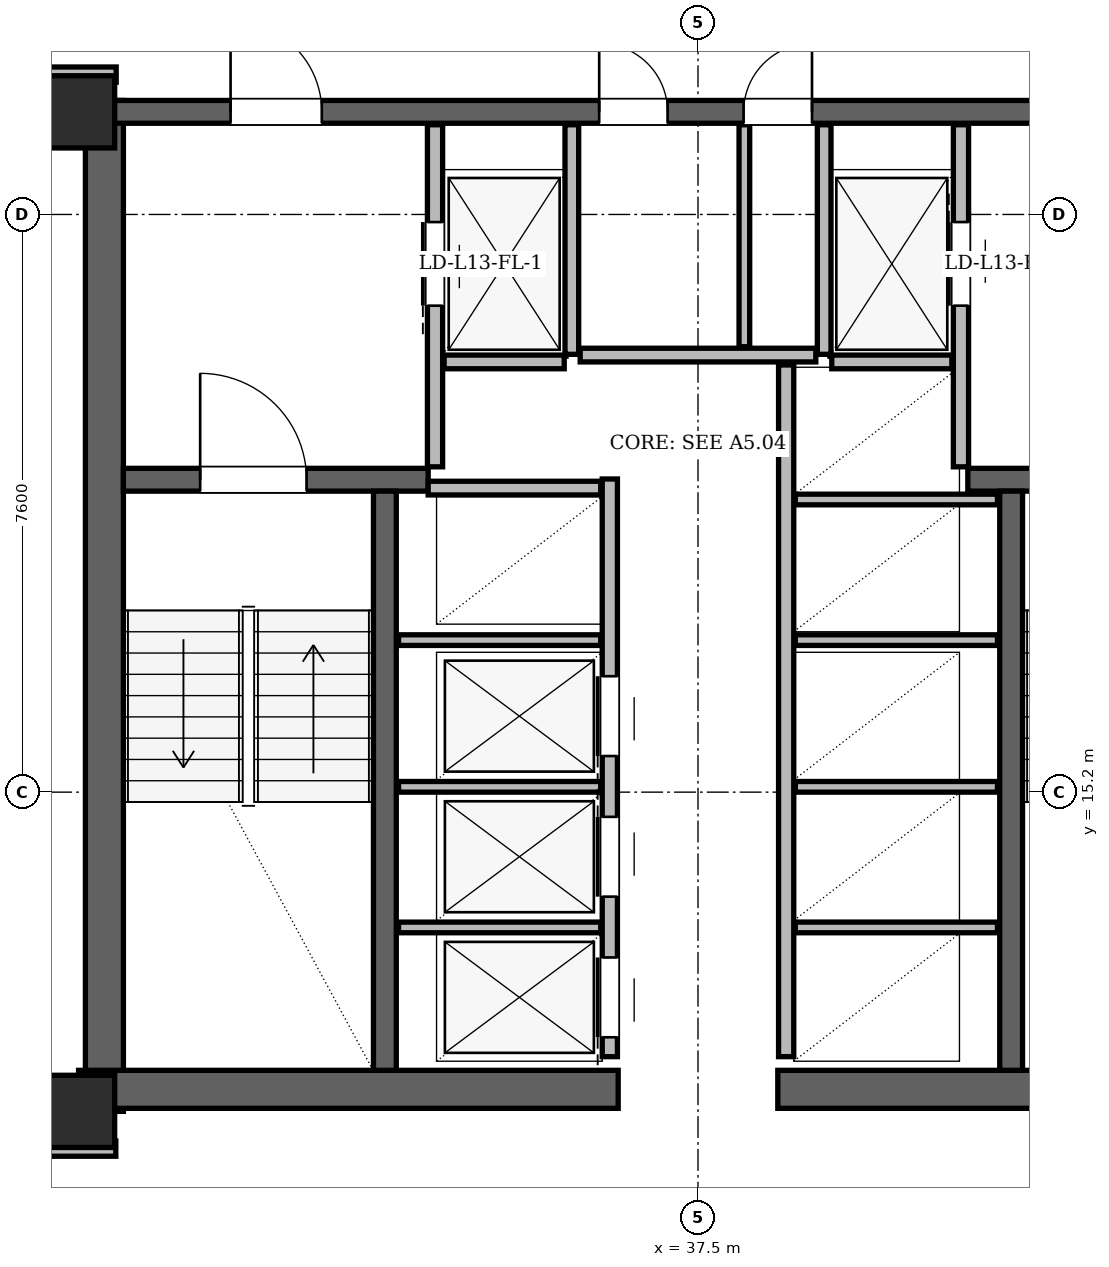
"""IFC4 building model, lengths in metres.
Left out: names, types, materials, properties, quantities, classifications, styles, units other than length and angle.
Written with IfcOpenShell. Run it as: python <this file> out.ifc"""

import sys

from ifc_helpers import new_model, si_unit, direction, frame, frame_2d, origin, origin_2d, place, context, subcontext, project, spatial, rectangle, hollow_rectangle, extrude, element, fill, save


model = new_model("IFC4")
c1 = context("Model", 3, precision=1e-05, world=origin(), true_north=direction((0.0, 1.0)))
c2 = subcontext(c1, "Body", "Model", "MODEL_VIEW")
j1 = project(units=[si_unit("LENGTHUNIT", "METRE"), si_unit("PLANEANGLEUNIT", "RADIAN")], contexts=[c1])
p1 = place(None, origin())
s1 = spatial("IfcSite", under=j1, at=p1, CompositionType="ELEMENT")
p2 = place(p1, origin())
s2 = spatial("IfcBuilding", under=s1, at=p2, CompositionType="ELEMENT")
p3 = place(p2, frame((0.0, 0.0, 52.5)))
s3 = spatial("IfcBuildingStorey", under=s2, at=p3, CompositionType="ELEMENT", Elevation=52.5)
for number, where, z_axis, x_axis in (
    (1, (29.35, 11.0, 0.0), (0.0, 0.0, 1.0), (1.0, 0.0, 0.0)),
    (2, (29.35, 24.15, 0.0), (0.0, 0.0, 1.0), (1.0, 0.0, 0.0)),
):
    element("IfcColumn", number, at=place(p3, frame(where, z_axis=z_axis, x_axis=x_axis)), inside=s3, PredefinedType="COLUMN", context=c2, shape_type="SweptSolid", body=[
        extrude(hollow_rectangle(XDim=0.95, YDim=0.95, WallThickness=0.08, at=origin_2d()), origin(), (0.0, 0.0, 1.0), 3.6),
    ])
p4 = place(p3, frame((29.69, 11.0, 0.0), z_axis=(0.0, 0.0, 1.0), x_axis=(0.0, 1.0, 0.0)))
e3 = element("IfcWall", 3, at=p4, inside=s3, PredefinedType="SHEAR", context=c2, shape_type="SweptSolid", body=[
    extrude(rectangle(XDim=13.3, YDim=0.5, at=frame_2d((6.65, 0.0))), origin(), (0.0, 0.0, 1.0), 3.36),
])
for number, where, z_axis, x_axis in (
    (4, (29.35, 11.29, 0.0), (0.0, 0.0, 1.0), (1.0, 0.0, 0.0)),
    (5, (38.55, 11.29, 0.0), (0.0, 0.0, 1.0), (1.0, 0.0, 0.0)),
):
    element("IfcWall", number, at=place(p3, frame(where, z_axis=z_axis, x_axis=x_axis)), inside=s3, PredefinedType="SHEAR", context=c2, shape_type="SweptSolid", body=[
        extrude(rectangle(XDim=7.1, YDim=0.5, at=frame_2d((3.55, 0.0))), origin(), (0.0, 0.0, 1.0), 3.36),
    ])
p5 = place(p3, frame((29.65, 24.15, 0.0), z_axis=(0.0, 0.0, 1.0), x_axis=(1.0, 0.0, 0.0)))
e6 = element("IfcWall", 6, at=p5, inside=s3, PredefinedType="SHEAR", context=c2, shape_type="SweptSolid", body=[
    extrude(rectangle(XDim=15.7, YDim=0.3, at=frame_2d((7.85, 0.0))), origin(), (0.0, 0.0, 1.0), 3.36),
])
p6 = place(p5, frame((1.7, 0.0, 0.0)))
e7 = element("IfcOpeningElement", 7, at=p6, cuts=e6, PredefinedType="OPENING", context=c2, shape_type="SweptSolid", body=[
    extrude(rectangle(XDim=1.2, YDim=2.2, at=frame_2d((0.6, 1.1))), frame((0.0, 0.15, 0.0), z_axis=(0.0, -1.0, 0.0), x_axis=(1.0, 0.0, 0.0)), (0.0, 0.0, 1.0), 0.3),
])
p7 = place(p5, frame((12.8, 0.0, 0.0)))
e8 = element("IfcOpeningElement", 8, at=p7, cuts=e6, PredefinedType="OPENING", context=c2, shape_type="SweptSolid", body=[
    extrude(rectangle(XDim=1.2, YDim=2.2, at=frame_2d((0.6, 1.1))), frame((0.0, 0.15, 0.0), z_axis=(0.0, -1.0, 0.0), x_axis=(1.0, 0.0, 0.0)), (0.0, 0.0, 1.0), 0.3),
])
p8 = place(p5, frame((6.55, 0.0, 0.0)))
e9 = element("IfcOpeningElement", 9, at=p8, cuts=e6, PredefinedType="OPENING", context=c2, shape_type="SweptSolid", body=[
    extrude(rectangle(XDim=0.9, YDim=2.05, at=frame_2d((0.45, 1.025))), frame((0.0, 0.15, 0.0), z_axis=(0.0, -1.0, 0.0), x_axis=(1.0, 0.0, 0.0)), (0.0, 0.0, 1.0), 0.3),
])
p9 = place(p5, frame((8.45, 0.0, 0.0)))
e10 = element("IfcOpeningElement", 10, at=p9, cuts=e6, PredefinedType="OPENING", context=c2, shape_type="SweptSolid", body=[
    extrude(rectangle(XDim=0.9, YDim=2.05, at=frame_2d((0.45, 1.025))), frame((0.0, 0.15, 0.0), z_axis=(0.0, -1.0, 0.0), x_axis=(1.0, 0.0, 0.0)), (0.0, 0.0, 1.0), 0.3),
])
p10 = place(p3, frame((29.94, 19.31, 0.0), z_axis=(0.0, 0.0, 1.0), x_axis=(1.0, 0.0, 0.0)))
e11 = element("IfcWall", 11, at=p10, inside=s3, PredefinedType="SHEAR", context=c2, shape_type="SweptSolid", body=[
    extrude(rectangle(XDim=4.01, YDim=0.3, at=frame_2d((2.005, 0.0))), origin(), (0.0, 0.0, 1.0), 3.36),
])
p11 = place(p10, frame((1.01, 0.0, 0.0)))
e12 = element("IfcOpeningElement", 12, at=p11, cuts=e11, PredefinedType="OPENING", context=c2, shape_type="SweptSolid", body=[
    extrude(rectangle(XDim=1.4, YDim=2.2, at=frame_2d((0.7, 1.1))), frame((0.0, 0.15, 0.0), z_axis=(0.0, -1.0, 0.0), x_axis=(1.0, 0.0, 0.0)), (0.0, 0.0, 1.0), 0.3),
])
p12 = place(p3, frame((41.05, 19.31, 0.0), z_axis=(0.0, 0.0, 1.0), x_axis=(1.0, 0.0, 0.0)))
e13 = element("IfcWall", 13, at=p12, inside=s3, PredefinedType="SHEAR", context=c2, shape_type="SweptSolid", body=[
    extrude(rectangle(XDim=4.01, YDim=0.3, at=frame_2d((2.005, 0.0))), origin(), (0.0, 0.0, 1.0), 3.36),
])
p13 = place(p12, frame((1.6, 0.0, 0.0)))
e14 = element("IfcOpeningElement", 14, at=p13, cuts=e13, PredefinedType="OPENING", context=c2, shape_type="SweptSolid", body=[
    extrude(rectangle(XDim=1.4, YDim=2.2, at=frame_2d((0.7, 1.1))), frame((0.0, 0.15, 0.0), z_axis=(0.0, -1.0, 0.0), x_axis=(1.0, 0.0, 0.0)), (0.0, 0.0, 1.0), 0.3),
])
for number, where, z_axis, x_axis in (
    (15, (33.38, 11.54, 0.0), (0.0, 0.0, 1.0), (0.0, 1.0, 0.0)),
    (16, (41.62, 11.54, 0.0), (0.0, 0.0, 1.0), (0.0, 1.0, 0.0)),
):
    element("IfcWall", number, at=place(p3, frame(where, z_axis=z_axis, x_axis=x_axis)), inside=s3, PredefinedType="SHEAR", context=c2, shape_type="SweptSolid", body=[
        extrude(rectangle(XDim=7.62, YDim=0.3, at=frame_2d((3.81, 0.0))), origin(), (0.0, 0.0, 1.0), 3.36),
    ])
p14 = place(p3, frame((30.243, 43.574, 0.0), z_axis=(0.0, 0.0, 1.0), x_axis=(-0.500001264705, -0.866024673605, 0.0)))
e17 = element("IfcWall", 17, at=p14, inside=s3, PredefinedType="SOLIDWALL", context=c2, shape_type="SweptSolid", body=[
    extrude(rectangle(XDim=33.402, YDim=0.34, at=frame_2d((16.701, 0.0))), origin(), (0.0, 0.0, 1.0), 2.494),
])
p15 = place(p14, frame((7.615, 0.0, 0.0)))
e18 = element("IfcOpeningElement", 18, at=p15, cuts=e17, PredefinedType="OPENING", context=c2, shape_type="SweptSolid", body=[
    extrude(rectangle(XDim=1.5, YDim=2.2, at=frame_2d((0.75, 1.1))), frame((0.0, 0.17, 0.0), z_axis=(0.0, -1.0, 0.0), x_axis=(1.0, 0.0, 0.0)), (0.0, 0.0, 1.0), 0.34),
])
p16 = place(p14, frame((25.742, 0.0, 0.0)))
e19 = element("IfcOpeningElement", 19, at=p16, cuts=e17, PredefinedType="OPENING", context=c2, shape_type="SweptSolid", body=[
    extrude(rectangle(XDim=1.5, YDim=2.2, at=frame_2d((0.75, 1.1))), frame((0.0, 0.17, 0.0), z_axis=(0.0, -1.0, 0.0), x_axis=(1.0, 0.0, 0.0)), (0.0, 0.0, 1.0), 0.34),
])
p17 = place(p14, frame((29.807, 0.0, 0.85)))
e20 = element("IfcOpeningElement", 20, at=p17, cuts=e17, PredefinedType="OPENING", context=c2, shape_type="SweptSolid", body=[
    extrude(rectangle(XDim=2.2, YDim=1.534, at=frame_2d((1.1, 0.767))), frame((0.0, 0.17, 0.0), z_axis=(0.0, -1.0, 0.0), x_axis=(1.0, 0.0, 0.0)), (0.0, 0.0, 1.0), 0.34),
])
p18 = place(p14, frame((1.321, 0.0, 0.85)))
e21 = element("IfcOpeningElement", 21, at=p18, cuts=e17, PredefinedType="OPENING", context=c2, shape_type="SweptSolid", body=[
    extrude(rectangle(XDim=2.6, YDim=1.534, at=frame_2d((1.3, 0.767))), frame((0.0, 0.17, 0.0), z_axis=(0.0, -1.0, 0.0), x_axis=(1.0, 0.0, 0.0)), (0.0, 0.0, 1.0), 0.34),
])
p19 = place(p14, frame((16.814, 0.0, 0.85)))
e22 = element("IfcOpeningElement", 22, at=p19, cuts=e17, PredefinedType="OPENING", context=c2, shape_type="SweptSolid", body=[
    extrude(rectangle(XDim=2.0, YDim=1.534, at=frame_2d((1.0, 0.767))), frame((0.0, 0.17, 0.0), z_axis=(0.0, -1.0, 0.0), x_axis=(1.0, 0.0, 0.0)), (0.0, 0.0, 1.0), 0.34),
])
p20 = place(p3, frame((34.04, 19.48, 0.0), z_axis=(0.0, 0.0, 1.0), x_axis=(0.0, 1.0, 0.0)))
e23 = element("IfcWall", 23, at=p20, inside=s3, PredefinedType="PARTITIONING", context=c2, shape_type="SweptSolid", body=[
    extrude(rectangle(XDim=4.5, YDim=0.2, at=frame_2d((2.25, 0.0))), origin(), (0.0, 0.0, 1.0), 2.4),
])
p21 = place(p20, frame((2.12, 0.0, 0.0)))
e24 = element("IfcOpeningElement", 24, at=p21, cuts=e23, PredefinedType="OPENING", context=c2, shape_type="SweptSolid", body=[
    extrude(rectangle(XDim=1.1, YDim=2.2, at=frame_2d((0.55, 1.1))), frame((0.0, 0.1, 0.0), z_axis=(0.0, -1.0, 0.0), x_axis=(1.0, 0.0, 0.0)), (0.0, 0.0, 1.0), 0.2),
])
p22 = place(p3, frame((35.84, 20.96, 0.0), z_axis=(0.0, 0.0, 1.0), x_axis=(0.0, 1.0, 0.0)))
e25 = element("IfcWall", 25, at=p22, inside=s3, PredefinedType="PARTITIONING", context=c2, shape_type="SweptSolid", body=[
    extrude(rectangle(XDim=3.02, YDim=0.18, at=frame_2d((1.51, 0.0))), origin(), (0.0, 0.0, 1.0), 2.4),
])
p23 = place(p3, frame((34.16, 20.86, 0.0), z_axis=(0.0, 0.0, 1.0), x_axis=(1.0, 0.0, 0.0)))
e26 = element("IfcWall", 26, at=p23, inside=s3, PredefinedType="PARTITIONING", context=c2, shape_type="SweptSolid", body=[
    extrude(rectangle(XDim=1.58, YDim=0.18, at=frame_2d((0.79, 0.0))), origin(), (0.0, 0.0, 1.0), 3.36),
])
p24 = place(p3, frame((40.96, 19.48, 0.0), z_axis=(0.0, 0.0, 1.0), x_axis=(0.0, 1.0, 0.0)))
e27 = element("IfcWall", 27, at=p24, inside=s3, PredefinedType="PARTITIONING", context=c2, shape_type="SweptSolid", body=[
    extrude(rectangle(XDim=4.5, YDim=0.2, at=frame_2d((2.25, 0.0))), origin(), (0.0, 0.0, 1.0), 2.4),
])
p25 = place(p24, frame((2.12, 0.0, 0.0)))
e28 = element("IfcOpeningElement", 28, at=p25, cuts=e27, PredefinedType="OPENING", context=c2, shape_type="SweptSolid", body=[
    extrude(rectangle(XDim=1.1, YDim=2.2, at=frame_2d((0.55, 1.1))), frame((0.0, 0.1, 0.0), z_axis=(0.0, -1.0, 0.0), x_axis=(1.0, 0.0, 0.0)), (0.0, 0.0, 1.0), 0.2),
])
p26 = place(p3, frame((39.16, 20.96, 0.0), z_axis=(0.0, 0.0, 1.0), x_axis=(0.0, 1.0, 0.0)))
e29 = element("IfcWall", 29, at=p26, inside=s3, PredefinedType="PARTITIONING", context=c2, shape_type="SweptSolid", body=[
    extrude(rectangle(XDim=3.02, YDim=0.18, at=frame_2d((1.51, 0.0))), origin(), (0.0, 0.0, 1.0), 2.4),
])
p27 = place(p3, frame((39.26, 20.86, 0.0), z_axis=(0.0, 0.0, 1.0), x_axis=(1.0, 0.0, 0.0)))
e30 = element("IfcWall", 30, at=p27, inside=s3, PredefinedType="PARTITIONING", context=c2, shape_type="SweptSolid", body=[
    extrude(rectangle(XDim=1.58, YDim=0.18, at=frame_2d((0.79, 0.0))), origin(), (0.0, 0.0, 1.0), 3.36),
])
p28 = place(p3, frame((36.34, 11.72, 0.0), z_axis=(0.0, 0.0, 1.0), x_axis=(0.0, 1.0, 0.0)))
e31 = element("IfcWall", 31, at=p28, inside=s3, PredefinedType="PARTITIONING", context=c2, shape_type="SweptSolid", body=[
    extrude(rectangle(XDim=7.6, YDim=0.2, at=frame_2d((3.8, 0.0))), origin(), (0.0, 0.0, 1.0), 3.36),
])
p29 = place(p28, frame((0.255, 0.0, 0.0)))
e32 = element("IfcOpeningElement", 32, at=p29, cuts=e31, PredefinedType="OPENING", context=c2, shape_type="SweptSolid", body=[
    extrude(rectangle(XDim=1.05, YDim=2.15, at=frame_2d((0.525, 1.075))), frame((0.0, 0.1, 0.0), z_axis=(0.0, -1.0, 0.0), x_axis=(1.0, 0.0, 0.0)), (0.0, 0.0, 1.0), 0.2),
])
p30 = place(p28, frame((2.105, 0.0, 0.0)))
e33 = element("IfcOpeningElement", 33, at=p30, cuts=e31, PredefinedType="OPENING", context=c2, shape_type="SweptSolid", body=[
    extrude(rectangle(XDim=1.05, YDim=2.15, at=frame_2d((0.525, 1.075))), frame((0.0, 0.1, 0.0), z_axis=(0.0, -1.0, 0.0), x_axis=(1.0, 0.0, 0.0)), (0.0, 0.0, 1.0), 0.2),
])
p31 = place(p28, frame((3.955, 0.0, 0.0)))
e34 = element("IfcOpeningElement", 34, at=p31, cuts=e31, PredefinedType="OPENING", context=c2, shape_type="SweptSolid", body=[
    extrude(rectangle(XDim=1.05, YDim=2.15, at=frame_2d((0.525, 1.075))), frame((0.0, 0.1, 0.0), z_axis=(0.0, -1.0, 0.0), x_axis=(1.0, 0.0, 0.0)), (0.0, 0.0, 1.0), 0.2),
])
p32 = place(p3, frame((33.95, 19.2, 0.0), z_axis=(0.0, 0.0, 1.0), x_axis=(1.0, 0.0, 0.0)))
e35 = element("IfcWall", 35, at=p32, inside=s3, PredefinedType="PARTITIONING", context=c2, shape_type="SweptSolid", body=[
    extrude(rectangle(XDim=2.27, YDim=0.18, at=frame_2d((1.135, 0.0))), origin(), (0.0, 0.0, 1.0), 3.36),
])
for number, where, z_axis, x_axis in (
    (36, (33.56, 13.42, 0.0), (0.0, 0.0, 1.0), (1.0, 0.0, 0.0)),
    (37, (33.56, 15.27, 0.0), (0.0, 0.0, 1.0), (1.0, 0.0, 0.0)),
    (38, (33.56, 17.2, 0.0), (0.0, 0.0, 1.0), (1.0, 0.0, 0.0)),
):
    element("IfcWall", number, at=place(p3, frame(where, z_axis=z_axis, x_axis=x_axis)), inside=s3, PredefinedType="PARTITIONING", context=c2, shape_type="SweptSolid", body=[
        extrude(rectangle(XDim=2.66, YDim=0.14, at=frame_2d((1.33, 0.0))), origin(), (0.0, 0.0, 1.0), 3.36),
    ])
p33 = place(p3, frame((38.66, 11.72, 0.0), z_axis=(0.0, 0.0, 1.0), x_axis=(0.0, 1.0, 0.0)))
e39 = element("IfcWall", 39, at=p33, inside=s3, PredefinedType="PARTITIONING", context=c2, shape_type="SweptSolid", body=[
    extrude(rectangle(XDim=9.1, YDim=0.2, at=frame_2d((4.55, 0.0))), origin(), (0.0, 0.0, 1.0), 3.36),
])
for number, where, z_axis, x_axis in (
    (40, (38.78, 13.42, 0.0), (0.0, 0.0, 1.0), (1.0, 0.0, 0.0)),
    (41, (38.78, 15.27, 0.0), (0.0, 0.0, 1.0), (1.0, 0.0, 0.0)),
    (42, (38.78, 17.2, 0.0), (0.0, 0.0, 1.0), (1.0, 0.0, 0.0)),
    (43, (38.78, 19.05, 0.0), (0.0, 0.0, 1.0), (1.0, 0.0, 0.0)),
):
    element("IfcWall", number, at=place(p3, frame(where, z_axis=z_axis, x_axis=x_axis)), inside=s3, PredefinedType="PARTITIONING", context=c2, shape_type="SweptSolid", body=[
        extrude(rectangle(XDim=2.66, YDim=0.14, at=frame_2d((1.33, 0.0))), origin(), (0.0, 0.0, 1.0), 3.36),
    ])
p34 = place(p3, frame((35.95, 20.95, 0.0), z_axis=(0.0, 0.0, 1.0), x_axis=(1.0, 0.0, 0.0)))
e44 = element("IfcWall", 44, at=p34, inside=s3, PredefinedType="PARTITIONING", context=c2, shape_type="SweptSolid", body=[
    extrude(rectangle(XDim=3.1, YDim=0.18, at=frame_2d((1.55, 0.0))), origin(), (0.0, 0.0, 1.0), 3.36),
])
p35 = place(p3, frame((38.11, 21.06, 0.0), z_axis=(0.0, 0.0, 1.0), x_axis=(0.0, 1.0, 0.0)))
e45 = element("IfcWall", 45, at=p35, inside=s3, PredefinedType="PARTITIONING", context=c2, shape_type="SweptSolid", body=[
    extrude(rectangle(XDim=2.92, YDim=0.14, at=frame_2d((1.46, 0.0))), origin(), (0.0, 0.0, 1.0), 2.4),
])
p36 = place(p3, frame((28.86, 10.51, 0.0), z_axis=(0.0, 0.0, 1.0), x_axis=(1.0, 0.0, 0.0)))
e46 = element("IfcWall", 46, at=p36, inside=s3, PredefinedType="PARTITIONING", context=c2, shape_type="SweptSolid", body=[
    extrude(rectangle(XDim=0.98, YDim=0.2, at=frame_2d((0.49, 0.0))), origin(), (0.0, 0.0, 1.0), 2.738),
])
p37 = place(p3, frame((28.855, 24.64, 0.0), z_axis=(0.0, 0.0, 1.0), x_axis=(1.0, 0.0, 0.0)))
e47 = element("IfcWall", 47, at=p37, inside=s3, PredefinedType="PARTITIONING", context=c2, shape_type="SweptSolid", body=[
    extrude(rectangle(XDim=0.99, YDim=0.2, at=frame_2d((0.495, 0.0))), origin(), (0.0, 0.0, 1.0), 2.738),
])
p38 = place(p21, origin())
e48 = element("IfcDoor", 48, at=p38, inside=s3, OperationType="SLIDING_TO_LEFT", PredefinedType="DOOR", context=c2, shape_type="SweptSolid", body=[
    extrude(rectangle(XDim=1.1, YDim=2.2, at=frame_2d((0.55, 1.1))), frame((0.0, 0.025, 0.0), z_axis=(0.0, -1.0, 0.0), x_axis=(1.0, 0.0, 0.0)), (0.0, 0.0, 1.0), 0.05),
])
fill(e24, e48)
p39 = place(p25, origin())
e49 = element("IfcDoor", 49, at=p39, inside=s3, OperationType="SLIDING_TO_RIGHT", PredefinedType="DOOR", context=c2, shape_type="SweptSolid", body=[
    extrude(rectangle(XDim=1.1, YDim=2.2, at=frame_2d((0.55, 1.1))), frame((0.0, 0.025, 0.0), z_axis=(0.0, -1.0, 0.0), x_axis=(1.0, 0.0, 0.0)), (0.0, 0.0, 1.0), 0.05),
])
fill(e28, e49)
p40 = place(p29, origin())
e50 = element("IfcDoor", 50, at=p40, inside=s3, OperationType="SLIDING_TO_LEFT", PredefinedType="DOOR", context=c2, shape_type="SweptSolid", body=[
    extrude(rectangle(XDim=1.05, YDim=2.15, at=frame_2d((0.525, 1.075))), frame((0.0, 0.025, 0.0), z_axis=(0.0, -1.0, 0.0), x_axis=(1.0, 0.0, 0.0)), (0.0, 0.0, 1.0), 0.05),
])
fill(e32, e50)
p41 = place(p30, origin())
e51 = element("IfcDoor", 51, at=p41, inside=s3, OperationType="SLIDING_TO_RIGHT", PredefinedType="DOOR", context=c2, shape_type="SweptSolid", body=[
    extrude(rectangle(XDim=1.05, YDim=2.15, at=frame_2d((0.525, 1.075))), frame((0.0, 0.025, 0.0), z_axis=(0.0, -1.0, 0.0), x_axis=(1.0, 0.0, 0.0)), (0.0, 0.0, 1.0), 0.05),
])
fill(e33, e51)
p42 = place(p31, origin())
e52 = element("IfcDoor", 52, at=p42, inside=s3, OperationType="SLIDING_TO_LEFT", PredefinedType="DOOR", context=c2, shape_type="SweptSolid", body=[
    extrude(rectangle(XDim=1.05, YDim=2.15, at=frame_2d((0.525, 1.075))), frame((0.0, 0.025, 0.0), z_axis=(0.0, -1.0, 0.0), x_axis=(1.0, 0.0, 0.0)), (0.0, 0.0, 1.0), 0.05),
])
fill(e34, e52)
p43 = place(p11, origin())
e53 = element("IfcDoor", 53, at=p43, inside=s3, OperationType="SINGLE_SWING_LEFT", PredefinedType="DOOR", context=c2, shape_type="SweptSolid", body=[
    extrude(rectangle(XDim=1.4, YDim=2.2, at=frame_2d((0.7, 1.1))), frame((0.0, 0.025, 0.0), z_axis=(0.0, -1.0, 0.0), x_axis=(1.0, 0.0, 0.0)), (0.0, 0.0, 1.0), 0.05),
])
fill(e12, e53)
p44 = place(p6, origin())
e54 = element("IfcDoor", 54, at=p44, inside=s3, OperationType="SINGLE_SWING_LEFT", PredefinedType="DOOR", context=c2, shape_type="SweptSolid", body=[
    extrude(rectangle(XDim=1.2, YDim=2.2, at=frame_2d((0.6, 1.1))), frame((0.0, 0.025, 0.0), z_axis=(0.0, -1.0, 0.0), x_axis=(1.0, 0.0, 0.0)), (0.0, 0.0, 1.0), 0.05),
])
fill(e7, e54)
p45 = place(p8, origin())
e55 = element("IfcDoor", 55, at=p45, inside=s3, OperationType="SINGLE_SWING_LEFT", PredefinedType="DOOR", context=c2, shape_type="SweptSolid", body=[
    extrude(rectangle(XDim=0.9, YDim=2.05, at=frame_2d((0.45, 1.025))), frame((0.0, 0.025, 0.0), z_axis=(0.0, -1.0, 0.0), x_axis=(1.0, 0.0, 0.0)), (0.0, 0.0, 1.0), 0.05),
])
fill(e9, e55)
p46 = place(p9, origin())
e56 = element("IfcDoor", 56, at=p46, inside=s3, OperationType="SINGLE_SWING_RIGHT", PredefinedType="DOOR", context=c2, shape_type="SweptSolid", body=[
    extrude(rectangle(XDim=0.9, YDim=2.05, at=frame_2d((0.45, 1.025))), frame((0.0, 0.025, 0.0), z_axis=(0.0, -1.0, 0.0), x_axis=(1.0, 0.0, 0.0)), (0.0, 0.0, 1.0), 0.05),
])
fill(e10, e56)
save(model, sys.argv[1])
